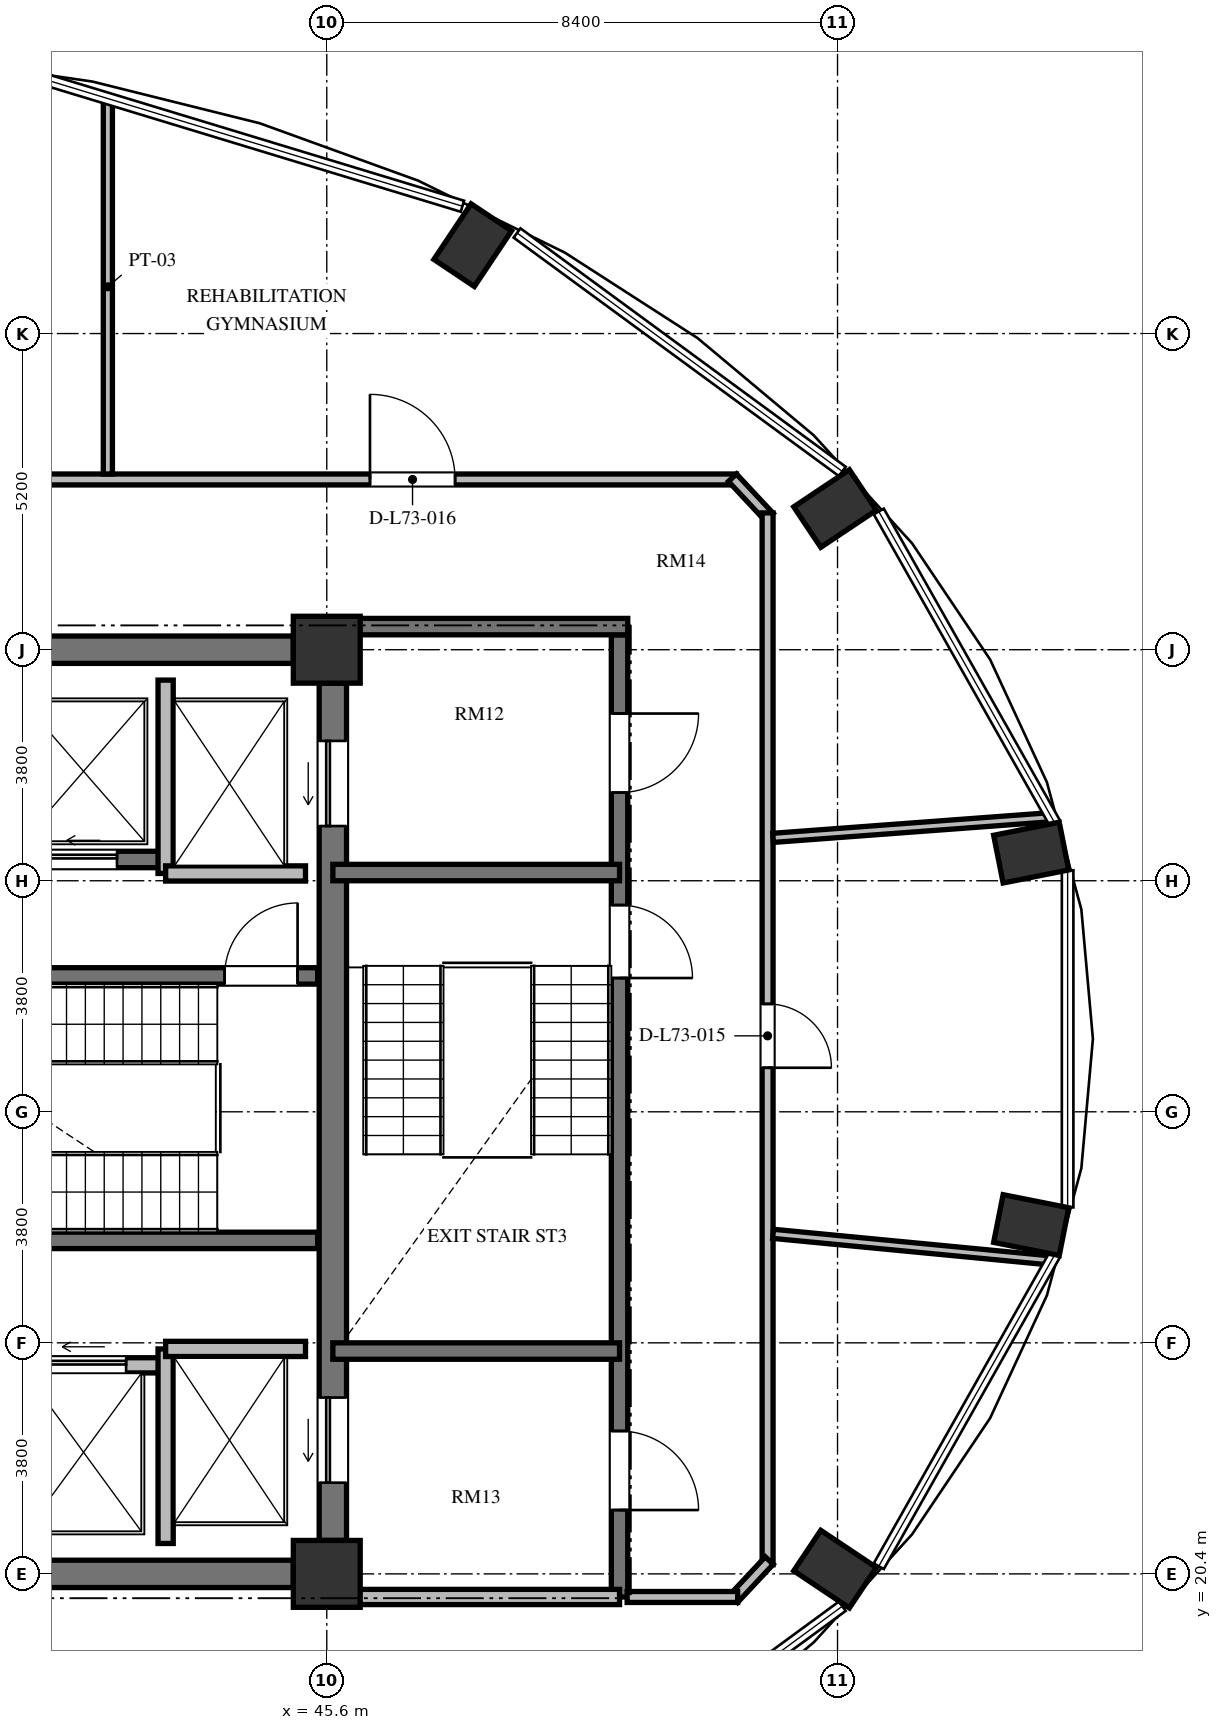
"""IFC4 building model, lengths in metres.
Left out: names, types, materials, properties, quantities, classifications, styles, units other than length and angle.
Written with IfcOpenShell. Run it as: python <this file> out.ifc"""

import sys

from ifc_helpers import new_model, si_unit, direction, frame, frame_2d, origin, origin_2d, place, context, subcontext, project, spatial, rectangle, extrude, element, fill, save


model = new_model("IFC4")
c1 = context("Model", 3, precision=1e-05, world=origin(), true_north=direction((0.0, 1.0)))
c2 = subcontext(c1, "Body", "Model", "MODEL_VIEW")
j1 = project(units=[si_unit("LENGTHUNIT", "METRE"), si_unit("PLANEANGLEUNIT", "RADIAN")], contexts=[c1])
p1 = place(None, origin())
s1 = spatial("IfcSite", under=j1, at=p1, CompositionType="ELEMENT")
p2 = place(p1, origin())
s2 = spatial("IfcBuilding", under=s1, at=p2, CompositionType="ELEMENT")
p3 = place(p2, frame((0.0, 0.0, 280.56)))
s3 = spatial("IfcBuildingStorey", under=s2, at=p3, CompositionType="ELEMENT", Elevation=280.56)
for number, where, z_axis, x_axis in (
    (1, (53.96, 20.478, 0.0), (0.0, 0.0, 1.0), (0.831, -0.556, 0.0)),
    (2, (57.185, 26.137, 0.0), (0.0, 0.0, 1.0), (0.981, -0.195, 0.0)),
    (3, (57.185, 32.263, 0.0), (0.0, 0.0, 1.0), (0.981, 0.195, 0.0)),
    (4, (53.96, 37.923, 0.0), (0.0, 0.0, 1.0), (0.831, 0.556, 0.0)),
    (5, (48.0, 42.254, 0.0), (0.0, 0.0, 1.0), (0.556, 0.831, 0.0)),
):
    element("IfcColumn", number, at=place(p3, frame(where, z_axis=z_axis, x_axis=x_axis)), inside=s3, PredefinedType="COLUMN", context=c2, shape_type="SweptSolid", body=[
        extrude(rectangle(XDim=1.1, YDim=0.8, at=origin_2d()), origin(), (0.0, 0.0, 1.0), 3.648),
    ])
for number, where, z_axis, x_axis in (
    (6, (45.6, 20.4, 0.0), (0.0, 0.0, 1.0), (1.0, 0.0, 0.0)),
    (7, (45.6, 35.6, 0.0), (0.0, 0.0, 1.0), (1.0, 0.0, 0.0)),
):
    element("IfcColumn", number, at=place(p3, frame(where, z_axis=z_axis, x_axis=x_axis)), inside=s3, PredefinedType="COLUMN", context=c2, shape_type="SweptSolid", body=[
        extrude(rectangle(XDim=1.1, YDim=1.1, at=origin_2d()), origin(), (0.0, 0.0, 1.0), 3.648),
    ])
p4 = place(p3, frame((45.7, 20.95, 0.0), z_axis=(0.0, 0.0, 1.0), x_axis=(0.0, 1.0, 0.0)))
e8 = element("IfcWall", 8, at=p4, inside=s3, PredefinedType="SHEAR", context=c2, shape_type="SweptSolid", body=[
    extrude(rectangle(XDim=14.1, YDim=0.45, at=frame_2d((7.05, 0.0))), origin(), (0.0, 0.0, 1.0), 3.648),
])
p5 = place(p4, frame((11.75, 0.0, 0.0)))
e9 = element("IfcOpeningElement", 9, at=p5, cuts=e8, PredefinedType="OPENING", context=c2, shape_type="SweptSolid", body=[
    extrude(rectangle(XDim=1.4, YDim=2.3, at=frame_2d((0.7, 1.15))), frame((0.0, 0.235, 0.0), z_axis=(0.0, -1.0, 0.0), x_axis=(1.0, 0.0, 0.0)), (0.0, 0.0, 1.0), 0.47),
])
p6 = place(p4, frame((0.95, 0.0, 0.0)))
e10 = element("IfcOpeningElement", 10, at=p6, cuts=e8, PredefinedType="OPENING", context=c2, shape_type="SweptSolid", body=[
    extrude(rectangle(XDim=1.4, YDim=2.3, at=frame_2d((0.7, 1.15))), frame((0.0, 0.235, 0.0), z_axis=(0.0, -1.0, 0.0), x_axis=(1.0, 0.0, 0.0)), (0.0, 0.0, 1.0), 0.47),
])
for number, where, z_axis, x_axis in (
    (11, (39.6, 20.4, 0.0), (0.0, 0.0, 1.0), (1.0, 0.0, 0.0)),
    (12, (39.6, 35.6, 0.0), (0.0, 0.0, 1.0), (1.0, 0.0, 0.0)),
):
    element("IfcWall", number, at=place(p3, frame(where, z_axis=z_axis, x_axis=x_axis)), inside=s3, PredefinedType="SHEAR", context=c2, shape_type="SweptSolid", body=[
        extrude(rectangle(XDim=5.45, YDim=0.45, at=frame_2d((2.725, 0.0))), origin(), (0.0, 0.0, 1.0), 3.648),
    ])
p7 = place(p3, frame((37.465, 30.235, 0.0), z_axis=(0.0, 0.0, 1.0), x_axis=(1.0, 0.0, 0.0)))
e13 = element("IfcWall", 13, at=p7, inside=s3, PredefinedType="SHEAR", context=c2, shape_type="SweptSolid", body=[
    extrude(rectangle(XDim=7.985, YDim=0.27, at=frame_2d((3.992, 0.0))), origin(), (0.0, 0.0, 1.0), 3.648),
])
p8 = place(p7, frame((6.455, 0.0, 0.0)))
e14 = element("IfcOpeningElement", 14, at=p8, cuts=e13, PredefinedType="OPENING", context=c2, shape_type="SweptSolid", body=[
    extrude(rectangle(XDim=1.2, YDim=2.15, at=frame_2d((0.6, 1.075))), frame((0.0, 0.145, 0.0), z_axis=(0.0, -1.0, 0.0), x_axis=(1.0, 0.0, 0.0)), (0.0, 0.0, 1.0), 0.29),
])
p9 = place(p3, frame((37.465, 25.885, 0.0), z_axis=(0.0, 0.0, 1.0), x_axis=(1.0, 0.0, 0.0)))
e15 = element("IfcWall", 15, at=p9, inside=s3, PredefinedType="SHEAR", context=c2, shape_type="SweptSolid", body=[
    extrude(rectangle(XDim=7.985, YDim=0.27, at=frame_2d((3.992, 0.0))), origin(), (0.0, 0.0, 1.0), 3.648),
])
p10 = place(p3, frame((26.55, 32.15, 0.0), z_axis=(0.0, 0.0, 1.0), x_axis=(1.0, 0.0, 0.0)))
e16 = element("IfcWall", 16, at=p10, inside=s3, PredefinedType="SHEAR", context=c2, shape_type="SweptSolid", body=[
    extrude(rectangle(XDim=16.4, YDim=0.27, at=frame_2d((8.2, 0.0))), origin(), (0.0, 0.0, 1.0), 3.648),
])
p11 = place(p10, frame((1.375, 0.0, 0.0)))
e17 = element("IfcOpeningElement", 17, at=p11, cuts=e16, PredefinedType="OPENING", context=c2, shape_type="SweptSolid", body=[
    extrude(rectangle(XDim=1.05, YDim=2.15, at=frame_2d((0.525, 1.075))), frame((0.0, 0.145, 0.0), z_axis=(0.0, -1.0, 0.0), x_axis=(1.0, 0.0, 0.0)), (0.0, 0.0, 1.0), 0.29),
])
p12 = place(p10, frame((4.975, 0.0, 0.0)))
e18 = element("IfcOpeningElement", 18, at=p12, cuts=e16, PredefinedType="OPENING", context=c2, shape_type="SweptSolid", body=[
    extrude(rectangle(XDim=1.05, YDim=2.15, at=frame_2d((0.525, 1.075))), frame((0.0, 0.145, 0.0), z_axis=(0.0, -1.0, 0.0), x_axis=(1.0, 0.0, 0.0)), (0.0, 0.0, 1.0), 0.29),
])
p13 = place(p10, frame((8.625, 0.0, 0.0)))
e19 = element("IfcOpeningElement", 19, at=p13, cuts=e16, PredefinedType="OPENING", context=c2, shape_type="SweptSolid", body=[
    extrude(rectangle(XDim=1.05, YDim=2.15, at=frame_2d((0.525, 1.075))), frame((0.0, 0.145, 0.0), z_axis=(0.0, -1.0, 0.0), x_axis=(1.0, 0.0, 0.0)), (0.0, 0.0, 1.0), 0.29),
])
p14 = place(p10, frame((11.9, 0.0, 0.0)))
e20 = element("IfcOpeningElement", 20, at=p14, cuts=e16, PredefinedType="OPENING", context=c2, shape_type="SweptSolid", body=[
    extrude(rectangle(XDim=1.1, YDim=2.2, at=frame_2d((0.55, 1.1))), frame((0.0, 0.145, 0.0), z_axis=(0.0, -1.0, 0.0), x_axis=(1.0, 0.0, 0.0)), (0.0, 0.0, 1.0), 0.29),
])
p15 = place(p10, frame((14.5, 0.0, 0.0)))
e21 = element("IfcOpeningElement", 21, at=p15, cuts=e16, PredefinedType="OPENING", context=c2, shape_type="SweptSolid", body=[
    extrude(rectangle(XDim=1.1, YDim=2.2, at=frame_2d((0.55, 1.1))), frame((0.0, 0.145, 0.0), z_axis=(0.0, -1.0, 0.0), x_axis=(1.0, 0.0, 0.0)), (0.0, 0.0, 1.0), 0.29),
])
p16 = place(p3, frame((26.75, 23.83, 0.0), z_axis=(0.0, 0.0, 1.0), x_axis=(1.0, 0.0, 0.0)))
e22 = element("IfcWall", 22, at=p16, inside=s3, PredefinedType="SOLIDWALL", context=c2, shape_type="SweptSolid", body=[
    extrude(rectangle(XDim=16.2, YDim=0.25, at=frame_2d((8.1, 0.0))), origin(), (0.0, 0.0, 1.0), 3.448),
])
p17 = place(p16, frame((2.025, 0.0, 0.0)))
e23 = element("IfcOpeningElement", 23, at=p17, cuts=e22, PredefinedType="OPENING", context=c2, shape_type="SweptSolid", body=[
    extrude(rectangle(XDim=1.05, YDim=2.15, at=frame_2d((0.525, 1.075))), frame((0.0, 0.135, 0.0), z_axis=(0.0, -1.0, 0.0), x_axis=(1.0, 0.0, 0.0)), (0.0, 0.0, 1.0), 0.27),
])
p18 = place(p16, frame((7.25, 0.0, 0.0)))
e24 = element("IfcOpeningElement", 24, at=p18, cuts=e22, PredefinedType="OPENING", context=c2, shape_type="SweptSolid", body=[
    extrude(rectangle(XDim=1.4, YDim=2.2, at=frame_2d((0.7, 1.1))), frame((0.0, 0.135, 0.0), z_axis=(0.0, -1.0, 0.0), x_axis=(1.0, 0.0, 0.0)), (0.0, 0.0, 1.0), 0.27),
])
p19 = place(p16, frame((11.7, 0.0, 0.0)))
e25 = element("IfcOpeningElement", 25, at=p19, cuts=e22, PredefinedType="OPENING", context=c2, shape_type="SweptSolid", body=[
    extrude(rectangle(XDim=1.1, YDim=2.2, at=frame_2d((0.55, 1.1))), frame((0.0, 0.135, 0.0), z_axis=(0.0, -1.0, 0.0), x_axis=(1.0, 0.0, 0.0)), (0.0, 0.0, 1.0), 0.27),
])
p20 = place(p16, frame((14.15, 0.0, 0.0)))
e26 = element("IfcOpeningElement", 26, at=p20, cuts=e22, PredefinedType="OPENING", context=c2, shape_type="SweptSolid", body=[
    extrude(rectangle(XDim=1.4, YDim=2.3, at=frame_2d((0.7, 1.15))), frame((0.0, 0.135, 0.0), z_axis=(0.0, -1.0, 0.0), x_axis=(1.0, 0.0, 0.0)), (0.0, 0.0, 1.0), 0.27),
])
p21 = place(p3, frame((42.95, 31.92, 0.0), z_axis=(0.0, 0.0, 1.0), x_axis=(0.0, 1.0, 0.0)))
e27 = element("IfcWall", 27, at=p21, inside=s3, PredefinedType="SOLIDWALL", context=c2, shape_type="SweptSolid", body=[
    extrude(rectangle(XDim=3.18, YDim=0.25, at=frame_2d((1.59, 0.0))), origin(), (0.0, 0.0, 1.0), 3.448),
])
p22 = place(p3, frame((42.95, 31.92, 0.0), z_axis=(0.0, 0.0, 1.0), x_axis=(1.0, 0.0, 0.0)))
e28 = element("IfcWall", 28, at=p22, inside=s3, PredefinedType="SOLIDWALL", context=c2, shape_type="SweptSolid", body=[
    extrude(rectangle(XDim=2.3, YDim=0.25, at=frame_2d((1.15, 0.0))), origin(), (0.0, 0.0, 1.0), 3.448),
])
p23 = place(p3, frame((42.95, 20.9, 0.0), z_axis=(0.0, 0.0, 1.0), x_axis=(0.0, 1.0, 0.0)))
e29 = element("IfcWall", 29, at=p23, inside=s3, PredefinedType="SOLIDWALL", context=c2, shape_type="SweptSolid", body=[
    extrude(rectangle(XDim=3.2, YDim=0.25, at=frame_2d((1.6, 0.0))), origin(), (0.0, 0.0, 1.0), 3.448),
])
p24 = place(p3, frame((42.95, 24.1, 0.0), z_axis=(0.0, 0.0, 1.0), x_axis=(1.0, 0.0, 0.0)))
e30 = element("IfcWall", 30, at=p24, inside=s3, PredefinedType="SOLIDWALL", context=c2, shape_type="SweptSolid", body=[
    extrude(rectangle(XDim=2.3, YDim=0.25, at=frame_2d((1.15, 0.0))), origin(), (0.0, 0.0, 1.0), 3.448),
])
p25 = place(p3, frame((50.415, 35.845, 0.0), z_axis=(0.0, 0.0, 1.0), x_axis=(0.0, -1.0, 0.0)))
e31 = element("IfcWall", 31, at=p25, inside=s3, PredefinedType="SHEAR", context=c2, shape_type="SweptSolid", body=[
    extrude(rectangle(XDim=15.825, YDim=0.27, at=frame_2d((7.913, 0.0))), origin(), (0.0, 0.0, 1.0), 3.648),
])
p26 = place(p25, frame((4.445, 0.0, 0.0)))
e32 = element("IfcOpeningElement", 32, at=p26, cuts=e31, PredefinedType="OPENING", context=c2, shape_type="SweptSolid", body=[
    extrude(rectangle(XDim=1.2, YDim=2.15, at=frame_2d((0.6, 1.075))), frame((0.0, 0.145, 0.0), z_axis=(0.0, -1.0, 0.0), x_axis=(1.0, 0.0, 0.0)), (0.0, 0.0, 1.0), 0.29),
])
p27 = place(p25, frame((1.295, 0.0, 0.0)))
e33 = element("IfcOpeningElement", 33, at=p27, cuts=e31, PredefinedType="OPENING", context=c2, shape_type="SweptSolid", body=[
    extrude(rectangle(XDim=1.3, YDim=2.2, at=frame_2d((0.65, 1.1))), frame((0.0, 0.145, 0.0), z_axis=(0.0, -1.0, 0.0), x_axis=(1.0, 0.0, 0.0)), (0.0, 0.0, 1.0), 0.29),
])
p28 = place(p25, frame((13.095, 0.0, 0.0)))
e34 = element("IfcOpeningElement", 34, at=p28, cuts=e31, PredefinedType="OPENING", context=c2, shape_type="SweptSolid", body=[
    extrude(rectangle(XDim=1.3, YDim=2.2, at=frame_2d((0.65, 1.1))), frame((0.0, 0.145, 0.0), z_axis=(0.0, -1.0, 0.0), x_axis=(1.0, 0.0, 0.0)), (0.0, 0.0, 1.0), 0.29),
])
p29 = place(p3, frame((45.925, 35.98, 0.0), z_axis=(0.0, 0.0, 1.0), x_axis=(1.0, 0.0, 0.0)))
e35 = element("IfcWall", 35, at=p29, inside=s3, PredefinedType="SHEAR", context=c2, shape_type="SweptSolid", body=[
    extrude(rectangle(XDim=4.625, YDim=0.27, at=frame_2d((2.312, 0.0))), origin(), (0.0, 0.0, 1.0), 3.648),
])
for number, where, z_axis, x_axis in (
    (36, (45.7, 31.935, 0.0), (0.0, 0.0, 1.0), (1.0, 0.0, 0.0)),
    (37, (45.7, 24.065, 0.0), (0.0, 0.0, 1.0), (1.0, 0.0, 0.0)),
):
    element("IfcWall", number, at=place(p3, frame(where, z_axis=z_axis, x_axis=x_axis)), inside=s3, PredefinedType="SHEAR", context=c2, shape_type="SweptSolid", body=[
        extrude(rectangle(XDim=4.715, YDim=0.27, at=frame_2d((2.357, 0.0))), origin(), (0.0, 0.0, 1.0), 3.648),
    ])
p30 = place(p3, frame((45.7, 20.02, 0.0), z_axis=(0.0, 0.0, 1.0), x_axis=(1.0, 0.0, 0.0)))
e38 = element("IfcWall", 38, at=p30, inside=s3, PredefinedType="SOLIDWALL", context=c2, shape_type="SweptSolid", body=[
    extrude(rectangle(XDim=4.715, YDim=0.25, at=frame_2d((2.357, 0.0))), origin(), (0.0, 0.0, 1.0), 3.448),
])
p31 = place(p3, frame((32.46, 38.4, 0.0), z_axis=(0.0, 0.0, 1.0), x_axis=(1.0, 0.0, 0.0)))
e39 = element("IfcWall", 39, at=p31, inside=s3, PredefinedType="PARTITIONING", context=c2, shape_type="SweptSolid", body=[
    extrude(rectangle(XDim=19.879, YDim=0.18, at=frame_2d((9.939, 0.0))), origin(), (0.0, 0.0, 1.0), 3.073),
])
p32 = place(p31, frame((13.851, 0.0, 0.0)))
e40 = element("IfcOpeningElement", 40, at=p32, cuts=e39, PredefinedType="OPENING", context=c2, shape_type="SweptSolid", body=[
    extrude(rectangle(XDim=1.4, YDim=2.2, at=frame_2d((0.7, 1.1))), frame((0.0, 0.1, 0.0), z_axis=(0.0, -1.0, 0.0), x_axis=(1.0, 0.0, 0.0)), (0.0, 0.0, 1.0), 0.2),
])
p33 = place(p31, frame((4.404, 0.0, 0.0)))
e41 = element("IfcOpeningElement", 41, at=p33, cuts=e39, PredefinedType="OPENING", context=c2, shape_type="SweptSolid", body=[
    extrude(rectangle(XDim=1.05, YDim=2.15, at=frame_2d((0.525, 1.075))), frame((0.0, 0.1, 0.0), z_axis=(0.0, -1.0, 0.0), x_axis=(1.0, 0.0, 0.0)), (0.0, 0.0, 1.0), 0.2),
])
p34 = place(p3, frame((52.272, 38.429, 0.0), z_axis=(0.0, 0.0, 1.0), x_axis=(0.682475113459, -0.730908831188, 0.0)))
e42 = element("IfcWall", 42, at=p34, inside=s3, PredefinedType="PARTITIONING", context=c2, shape_type="SweptSolid", body=[
    extrude(rectangle(XDim=0.887, YDim=0.18, at=frame_2d((0.444, 0.0))), origin(), (0.0, 0.0, 1.0), 3.448),
])
p35 = place(p3, frame((52.85, 37.85, 0.0), z_axis=(0.0, 0.0, 1.0), x_axis=(0.0, -1.0, 0.0)))
e43 = element("IfcWall", 43, at=p35, inside=s3, PredefinedType="PARTITIONING", context=c2, shape_type="SweptSolid", body=[
    extrude(rectangle(XDim=17.3, YDim=0.18, at=frame_2d((8.65, 0.0))), origin(), (0.0, 0.0, 1.0), 3.448),
])
p36 = place(p35, frame((8.076, 0.0, 0.0)))
e44 = element("IfcOpeningElement", 44, at=p36, cuts=e43, PredefinedType="OPENING", context=c2, shape_type="SweptSolid", body=[
    extrude(rectangle(XDim=1.05, YDim=2.15, at=frame_2d((0.525, 1.075))), frame((0.0, 0.1, 0.0), z_axis=(0.0, -1.0, 0.0), x_axis=(1.0, 0.0, 0.0)), (0.0, 0.0, 1.0), 0.2),
])
p37 = place(p3, frame((52.877, 20.619, 0.0), z_axis=(0.0, 0.0, 1.0), x_axis=(-0.682409308253, -0.730970270264, 0.0)))
e45 = element("IfcWall", 45, at=p37, inside=s3, PredefinedType="PARTITIONING", context=c2, shape_type="SweptSolid", body=[
    extrude(rectangle(XDim=0.86, YDim=0.18, at=frame_2d((0.43, 0.0))), origin(), (0.0, 0.0, 1.0), 3.448),
])
p38 = place(p3, frame((52.358, 20.02, 0.0), z_axis=(0.0, 0.0, 1.0), x_axis=(-1.0, 0.0, 0.0)))
e46 = element("IfcWall", 46, at=p38, inside=s3, PredefinedType="PARTITIONING", context=c2, shape_type="SweptSolid", body=[
    extrude(rectangle(XDim=1.818, YDim=0.18, at=frame_2d((0.909, 0.0))), origin(), (0.0, 0.0, 1.0), 3.448),
])
p39 = place(p3, frame((52.94, 25.993, 0.0), z_axis=(0.0, 0.0, 1.0), x_axis=(0.995435221006, -0.095439618505, 0.0)))
e47 = element("IfcWall", 47, at=p39, inside=s3, PredefinedType="PARTITIONING", context=c2, shape_type="SweptSolid", body=[
    extrude(rectangle(XDim=4.604, YDim=0.15, at=frame_2d((2.302, 0.0))), origin(), (0.0, 0.0, 1.0), 3.448),
])
p40 = place(p3, frame((52.94, 32.506, 0.0), z_axis=(0.0, 0.0, 1.0), x_axis=(0.997246844083, 0.074153435301, 0.0)))
e48 = element("IfcWall", 48, at=p40, inside=s3, PredefinedType="PARTITIONING", context=c2, shape_type="SweptSolid", body=[
    extrude(rectangle(XDim=4.596, YDim=0.15, at=frame_2d((2.298, 0.0))), origin(), (0.0, 0.0, 1.0), 3.448),
])
p41 = place(p3, frame((42.0, 38.49, 0.0), z_axis=(0.0, 0.0, 1.0), x_axis=(0.0, 1.0, 0.0)))
e49 = element("IfcWall", 49, at=p41, inside=s3, PredefinedType="PARTITIONING", context=c2, shape_type="SweptSolid", body=[
    extrude(rectangle(XDim=6.158, YDim=0.15, at=frame_2d((3.079, 0.0))), origin(), (0.0, 0.0, 1.0), 3.448),
])
p42 = place(p8, origin())
e50 = element("IfcDoor", 50, at=p42, inside=s3, OperationType="SINGLE_SWING_RIGHT", PredefinedType="DOOR", context=c2, shape_type="SweptSolid", body=[
    extrude(rectangle(XDim=1.2, YDim=2.15, at=frame_2d((0.6, 1.075))), frame((0.0, 0.025, 0.0), z_axis=(0.0, -1.0, 0.0), x_axis=(1.0, 0.0, 0.0)), (0.0, 0.0, 1.0), 0.05),
])
fill(e14, e50)
p43 = place(p15, origin())
e51 = element("IfcDoor", 51, at=p43, inside=s3, OperationType="SLIDING_TO_LEFT", PredefinedType="DOOR", context=c2, shape_type="SweptSolid", body=[
    extrude(rectangle(XDim=1.1, YDim=2.2, at=frame_2d((0.55, 1.1))), frame((0.0, 0.025, 0.0), z_axis=(0.0, -1.0, 0.0), x_axis=(1.0, 0.0, 0.0)), (0.0, 0.0, 1.0), 0.05),
])
fill(e21, e51)
p44 = place(p5, origin())
e52 = element("IfcDoor", 52, at=p44, inside=s3, OperationType="SLIDING_TO_LEFT", PredefinedType="DOOR", context=c2, shape_type="SweptSolid", body=[
    extrude(rectangle(XDim=1.4, YDim=2.3, at=frame_2d((0.7, 1.15))), frame((0.0, 0.025, 0.0), z_axis=(0.0, -1.0, 0.0), x_axis=(1.0, 0.0, 0.0)), (0.0, 0.0, 1.0), 0.05),
])
fill(e9, e52)
p45 = place(p6, origin())
e53 = element("IfcDoor", 53, at=p45, inside=s3, OperationType="SLIDING_TO_LEFT", PredefinedType="DOOR", context=c2, shape_type="SweptSolid", body=[
    extrude(rectangle(XDim=1.4, YDim=2.3, at=frame_2d((0.7, 1.15))), frame((0.0, 0.025, 0.0), z_axis=(0.0, -1.0, 0.0), x_axis=(1.0, 0.0, 0.0)), (0.0, 0.0, 1.0), 0.05),
])
fill(e10, e53)
p46 = place(p20, origin())
e54 = element("IfcDoor", 54, at=p46, inside=s3, OperationType="SLIDING_TO_LEFT", PredefinedType="DOOR", context=c2, shape_type="SweptSolid", body=[
    extrude(rectangle(XDim=1.4, YDim=2.3, at=frame_2d((0.7, 1.15))), frame((0.0, 0.025, 0.0), z_axis=(0.0, -1.0, 0.0), x_axis=(1.0, 0.0, 0.0)), (0.0, 0.0, 1.0), 0.05),
])
fill(e26, e54)
p47 = place(p26, origin())
e55 = element("IfcDoor", 55, at=p47, inside=s3, OperationType="SINGLE_SWING_RIGHT", PredefinedType="DOOR", context=c2, shape_type="SweptSolid", body=[
    extrude(rectangle(XDim=1.2, YDim=2.15, at=frame_2d((0.6, 1.075))), frame((0.0, 0.025, 0.0), z_axis=(0.0, -1.0, 0.0), x_axis=(1.0, 0.0, 0.0)), (0.0, 0.0, 1.0), 0.05),
])
fill(e32, e55)
p48 = place(p27, origin())
e56 = element("IfcDoor", 56, at=p48, inside=s3, OperationType="SINGLE_SWING_LEFT", PredefinedType="DOOR", context=c2, shape_type="SweptSolid", body=[
    extrude(rectangle(XDim=1.3, YDim=2.2, at=frame_2d((0.65, 1.1))), frame((0.0, 0.025, 0.0), z_axis=(0.0, -1.0, 0.0), x_axis=(1.0, 0.0, 0.0)), (0.0, 0.0, 1.0), 0.05),
])
fill(e33, e56)
p49 = place(p28, origin())
e57 = element("IfcDoor", 57, at=p49, inside=s3, OperationType="SINGLE_SWING_RIGHT", PredefinedType="DOOR", context=c2, shape_type="SweptSolid", body=[
    extrude(rectangle(XDim=1.3, YDim=2.2, at=frame_2d((0.65, 1.1))), frame((0.0, 0.025, 0.0), z_axis=(0.0, -1.0, 0.0), x_axis=(1.0, 0.0, 0.0)), (0.0, 0.0, 1.0), 0.05),
])
fill(e34, e57)
p50 = place(p36, origin())
e58 = element("IfcDoor", 58, at=p50, inside=s3, OperationType="SINGLE_SWING_RIGHT", PredefinedType="DOOR", context=c2, shape_type="SweptSolid", body=[
    extrude(rectangle(XDim=1.05, YDim=2.15, at=frame_2d((0.525, 1.075))), frame((0.0, 0.025, 0.0), z_axis=(0.0, -1.0, 0.0), x_axis=(1.0, 0.0, 0.0)), (0.0, 0.0, 1.0), 0.05),
])
fill(e44, e58)
p51 = place(p32, origin())
e59 = element("IfcDoor", 59, at=p51, inside=s3, OperationType="SINGLE_SWING_LEFT", PredefinedType="DOOR", context=c2, shape_type="SweptSolid", body=[
    extrude(rectangle(XDim=1.4, YDim=2.2, at=frame_2d((0.7, 1.1))), frame((0.0, 0.025, 0.0), z_axis=(0.0, -1.0, 0.0), x_axis=(1.0, 0.0, 0.0)), (0.0, 0.0, 1.0), 0.05),
])
fill(e40, e59)
save(model, sys.argv[1])
